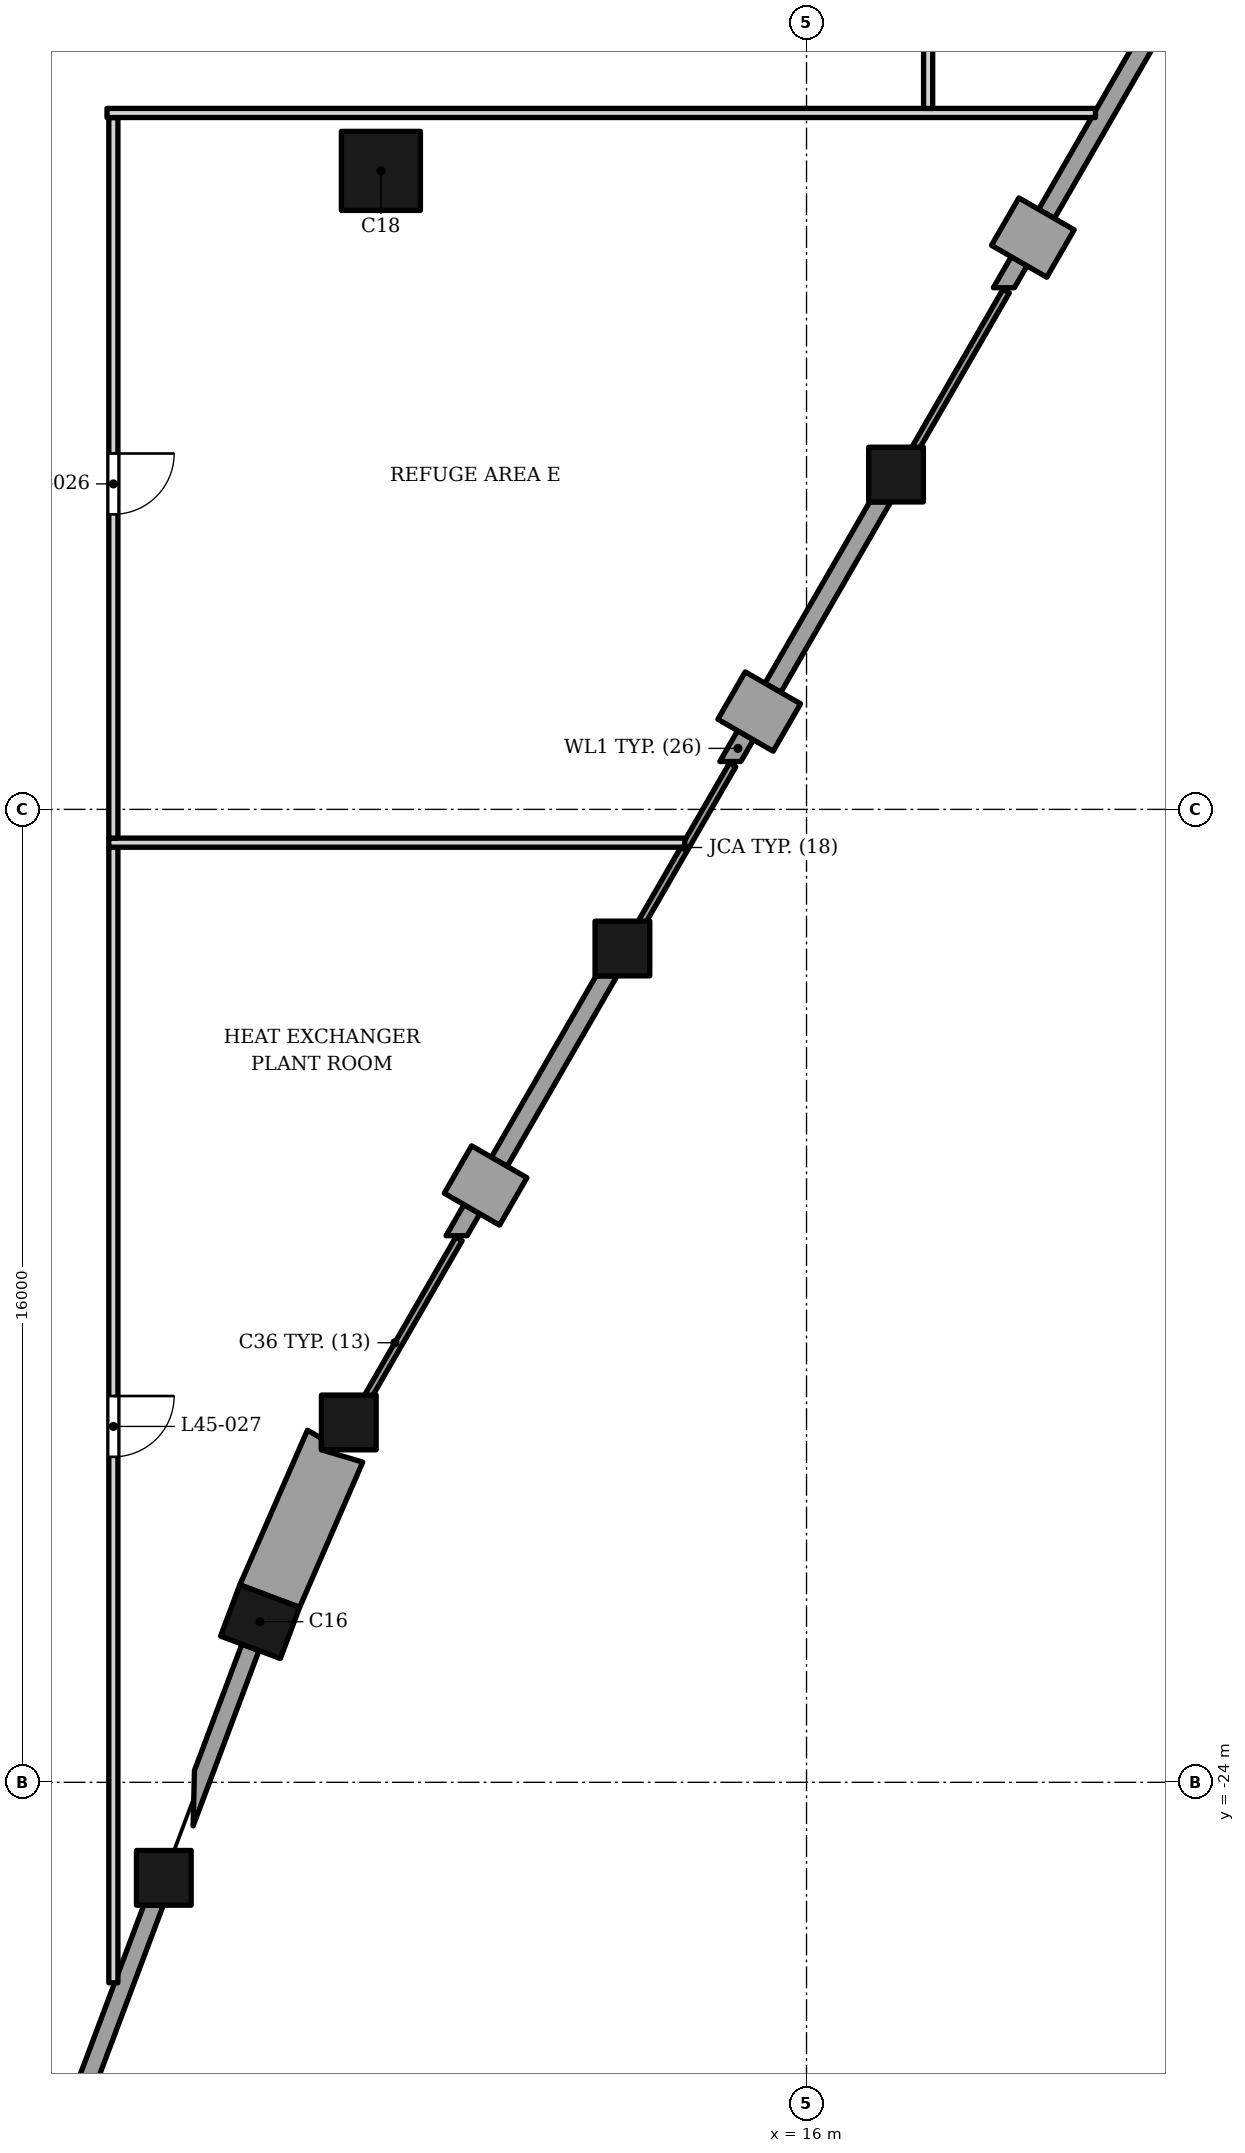
"""IFC4 building model, lengths in metres.
Left out: names, types, materials, properties, quantities, classifications, styles, units other than length and angle.
Written with IfcOpenShell. Run it as: python <this file> out.ifc"""

import sys

from ifc_helpers import new_model, si_unit, direction, frame, frame_2d, origin, origin_2d, place, context, subcontext, project, spatial, polyline, rectangle, outline, extrude, clip, halfspace, element, fill, save


model = new_model("IFC4")
c1 = context("Model", 3, precision=1e-05, world=origin(), true_north=direction((0.0, 1.0)))
c2 = subcontext(c1, "Body", "Model", "MODEL_VIEW")
j1 = project(units=[si_unit("LENGTHUNIT", "METRE"), si_unit("PLANEANGLEUNIT", "RADIAN")], contexts=[c1])
p1 = place(None, origin())
s1 = spatial("IfcSite", under=j1, at=p1, CompositionType="ELEMENT")
p2 = place(p1, origin())
s2 = spatial("IfcBuilding", under=s1, at=p2, CompositionType="ELEMENT")
p3 = place(p2, frame((0.0, 0.0, 191.4)))
s3 = spatial("IfcBuildingStorey", under=s2, at=p3, CompositionType="ELEMENT", Elevation=191.4)
p4 = place(p3, frame((7.013, -21.359, 0.0), z_axis=(0.0, 0.0, 1.0), x_axis=(0.351822451979, 0.936066750977, 0.0)))
e1 = element("IfcColumn", 1, at=p4, inside=s3, PredefinedType="COLUMN", context=c2, shape_type="SweptSolid", body=[
    extrude(rectangle(XDim=0.9, YDim=1.05, at=origin_2d()), origin(), (0.0, 0.0, 1.0), 5.0),
])
p5 = place(p3, frame((9.0, 2.5, 0.0), z_axis=(0.0, 0.0, 1.0), x_axis=(1.0, 0.0, 0.0)))
e2 = element("IfcColumn", 2, at=p5, inside=s3, PredefinedType="COLUMN", context=c2, shape_type="SweptSolid", body=[
    extrude(rectangle(XDim=1.3, YDim=1.3, at=origin_2d()), origin(), (0.0, 0.0, 1.0), 5.0),
])
p6 = place(p3, frame((5.43, -25.571, 0.0), z_axis=(0.010188943568, 0.420448971331, 0.90725897512), x_axis=(-0.999706498383, 0.024226371787, 0.0)))
e3 = element("IfcColumn", 3, at=p6, inside=s3, PredefinedType="COLUMN", context=c2, shape_type="Clipping", body=[
    clip(clip(extrude(rectangle(XDim=0.9, YDim=0.9, at=origin_2d()), origin(), (0.0, 0.0, 1.0), 5.511), halfspace(frame((0.0, 0.0, 0.213), z_axis=(0.0, 0.0, 1.0), x_axis=(1.0, 0.0, 0.0)), True)), halfspace(frame((0.0, 0.0, 5.298), z_axis=(0.0, 0.0, 1.0), x_axis=(1.0, 0.0, 0.0)), False)),
])
p7 = place(p3, frame((8.472, -18.082, 0.0), z_axis=(0.259037390288, 0.448574906754, 0.855383062413), x_axis=(-0.865981474287, 0.500076080403, 0.0)))
e4 = element("IfcColumn", 4, at=p7, inside=s3, PredefinedType="COLUMN", context=c2, shape_type="Clipping", body=[
    clip(clip(extrude(rectangle(XDim=0.9, YDim=0.9, at=origin_2d()), origin(), (0.0, 0.0, 1.0), 5.845), halfspace(frame((0.0, 0.0, 0.277), z_axis=(0.0, 0.0, 1.0), x_axis=(1.0, 0.0, 0.0)), True)), halfspace(frame((0.0, 0.0, 5.568), z_axis=(0.0, 0.0, 1.0), x_axis=(1.0, 0.0, 0.0)), False)),
])
p8 = place(p3, frame((12.972, -10.288, 0.0), z_axis=(0.258979139015, 0.448975121363, 0.855190707358), x_axis=(-0.866223138365, 0.499657357156, 0.0)))
e5 = element("IfcColumn", 5, at=p8, inside=s3, PredefinedType="COLUMN", context=c2, shape_type="Clipping", body=[
    clip(clip(extrude(rectangle(XDim=0.9, YDim=0.9, at=origin_2d()), origin(), (0.0, 0.0, 1.0), 5.847), halfspace(frame((0.0, 0.0, 0.277), z_axis=(0.0, 0.0, 1.0), x_axis=(1.0, 0.0, 0.0)), True)), halfspace(frame((0.0, 0.0, 5.57), z_axis=(0.0, 0.0, 1.0), x_axis=(1.0, 0.0, 0.0)), False)),
])
p9 = place(p3, frame((17.472, -2.494, 0.0), z_axis=(0.259022829884, 0.448674985721, 0.855334981622), x_axis=(-0.866041947256, 0.499971344772, 0.0)))
e6 = element("IfcColumn", 6, at=p9, inside=s3, PredefinedType="COLUMN", context=c2, shape_type="Clipping", body=[
    clip(clip(extrude(rectangle(XDim=0.9, YDim=0.9, at=origin_2d()), origin(), (0.0, 0.0, 1.0), 5.846), halfspace(frame((0.0, 0.0, 0.277), z_axis=(0.0, 0.0, 1.0), x_axis=(1.0, 0.0, 0.0)), True)), halfspace(frame((0.0, 0.0, 5.569), z_axis=(0.0, 0.0, 1.0), x_axis=(1.0, 0.0, 0.0)), False)),
])
p10 = place(p3, origin())
e7 = element("IfcWall", 7, at=p10, inside=s3, PredefinedType="ELEMENTEDWALL", context=c2, shape_type="SweptSolid", body=[
    extrude(outline(polyline([(5.412, -26.045), (5.347, -26.021), (5.101, -26.021), (3.865, -29.31), (4.146, -29.415), (5.412, -26.045)])), origin(), (0.0, 0.0, 1.0), 3.5),
])
p11 = place(p3, origin())
e8 = element("IfcWall", 8, at=p11, inside=s3, PredefinedType="ELEMENTEDWALL", context=c2, shape_type="SweptSolid", body=[
    extrude(outline(polyline([(5.912, -24.717), (6.995, -21.833), (6.715, -21.728), (5.934, -23.805), (5.912, -24.717)])), origin(), (0.0, 0.0, 1.0), 3.5),
])
for number, where, z_axis, x_axis in (
    (9, (11.176, -14.448, 0.0), (0.0, 0.0, 1.0), (-0.866, 0.5, 0.0)),
    (10, (15.676, -6.653, 0.0), (0.0, 0.0, 1.0), (-0.866, 0.5, 0.0)),
    (11, (19.267, 1.666, 0.0), (0.0, 0.0, 1.0), (0.866, -0.5, 0.0)),
):
    element("IfcWall", number, at=place(p3, frame(where, z_axis=z_axis, x_axis=x_axis)), inside=s3, PredefinedType="SOLIDWALL", context=c2, shape_type="SweptSolid", body=[
        extrude(rectangle(XDim=1.05, YDim=0.9, at=frame_2d((0.525, 0.0))), origin(), (0.0, 0.0, 1.0), 3.5),
    ])
p12 = place(p3, origin())
e12 = element("IfcWall", 12, at=p12, inside=s3, PredefinedType="ELEMENTEDWALL", context=c2, shape_type="SweptSolid", body=[
    extrude(outline(polyline([(10.367, -14.5), (10.072, -15.01), (10.419, -15.01), (10.627, -14.65), (10.367, -14.5)])), origin(), (0.0, 0.0, 1.0), 3.5),
])
p13 = place(p3, origin())
e13 = element("IfcWall", 13, at=p13, inside=s3, PredefinedType="ELEMENTEDWALL", context=c2, shape_type="SweptSolid", body=[
    extrude(outline(polyline([(12.877, -10.753), (12.851, -10.738), (12.539, -10.738), (10.817, -13.72), (11.077, -13.87), (12.877, -10.753)])), origin(), (0.0, 0.0, 1.0), 3.5),
])
p14 = place(p3, origin())
e14 = element("IfcWall", 14, at=p14, inside=s3, PredefinedType="ELEMENTEDWALL", context=c2, shape_type="SweptSolid", body=[
    extrude(outline(polyline([(14.867, -6.706), (14.574, -7.213), (14.92, -7.213), (15.127, -6.856), (14.867, -6.706)])), origin(), (0.0, 0.0, 1.0), 3.5),
])
p15 = place(p3, origin())
e15 = element("IfcWall", 15, at=p15, inside=s3, PredefinedType="ELEMENTEDWALL", context=c2, shape_type="SweptSolid", body=[
    extrude(outline(polyline([(17.377, -2.958), (17.352, -2.944), (17.039, -2.944), (15.317, -5.926), (15.577, -6.076), (17.377, -2.958)])), origin(), (0.0, 0.0, 1.0), 3.5),
])
p16 = place(p3, origin())
e16 = element("IfcWall", 16, at=p16, inside=s3, PredefinedType="ELEMENTEDWALL", context=c2, shape_type="SweptSolid", body=[
    extrude(outline(polyline([(19.367, 1.089), (19.073, 0.579), (19.419, 0.579), (19.627, 0.939), (19.367, 1.089)])), origin(), (0.0, 0.0, 1.0), 3.5),
])
p17 = place(p3, origin())
e17 = element("IfcWall", 17, at=p17, inside=s3, PredefinedType="ELEMENTEDWALL", context=c2, shape_type="SweptSolid", body=[
    extrude(outline(polyline([(21.877, 4.836), (21.852, 4.85), (21.538, 4.85), (19.817, 1.868), (20.077, 1.718), (21.877, 4.836)])), origin(), (0.0, 0.0, 1.0), 3.5),
])
p18 = place(p3, origin())
e18 = element("IfcWall", 18, at=p18, inside=s3, PredefinedType="SOLIDWALL", context=c2, shape_type="SweptSolid", body=[
    extrude(outline(polyline([(6.68, -20.753), (7.663, -21.123), (8.701, -18.734), (8.022, -18.532), (8.022, -18.342), (7.792, -18.209), (6.68, -20.753)])), origin(), (0.0, 0.0, 1.0), 3.5),
])
for number, where, z_axis, x_axis in (
    (19, (8.717, -17.778, 0.0), (0.0, 0.0, 1.0), (0.5, 0.866, 0.0)),
    (20, (13.216, -9.984, 0.0), (0.0, 0.0, 1.0), (0.5, 0.866, 0.0)),
    (21, (17.716, -2.19, 0.0), (0.0, 0.0, 1.0), (0.5, 0.866, 0.0)),
):
    element("IfcWall", number, at=place(p3, frame(where, z_axis=z_axis, x_axis=x_axis)), inside=s3, PredefinedType="SOLIDWALL", context=c2, shape_type="SweptSolid", body=[
        extrude(rectangle(XDim=3.135, YDim=0.12, at=frame_2d((1.567, 0.0))), origin(), (0.0, 0.0, 1.0), 3.5),
    ])
p19 = place(p3, frame((4.6, -27.297, 0.0), z_axis=(0.0, 0.0, 1.0), x_axis=(0.0, 1.0, 0.0)))
e22 = element("IfcWall", 22, at=p19, inside=s3, PredefinedType="PARTITIONING", context=c2, shape_type="SweptSolid", body=[
    extrude(rectangle(XDim=18.674, YDim=0.15, at=frame_2d((9.337, 0.0))), origin(), (0.0, 0.0, 1.0), 3.752),
])
p20 = place(p19, frame((8.649, 0.0, 0.0)))
e23 = element("IfcOpeningElement", 23, at=p20, cuts=e22, PredefinedType="OPENING", context=c2, shape_type="SweptSolid", body=[
    extrude(rectangle(XDim=1.0, YDim=2.1, at=frame_2d((0.5, 1.05))), frame((0.0, 0.085, 0.0), z_axis=(0.0, -1.0, 0.0), x_axis=(1.0, 0.0, 0.0)), (0.0, 0.0, 1.0), 0.17),
])
p21 = place(p3, frame((4.525, -8.547, 0.0), z_axis=(0.0, 0.0, 1.0), x_axis=(1.0, 0.0, 0.0)))
e24 = element("IfcWall", 24, at=p21, inside=s3, PredefinedType="PARTITIONING", context=c2, shape_type="SweptSolid", body=[
    extrude(rectangle(XDim=9.472, YDim=0.15, at=frame_2d((4.736, 0.0))), origin(), (0.0, 0.0, 1.0), 3.984),
])
p22 = place(p3, frame((4.6, -8.472, 0.0), z_axis=(0.0, 0.0, 1.0), x_axis=(0.0, 1.0, 0.0)))
e25 = element("IfcWall", 25, at=p22, inside=s3, PredefinedType="PARTITIONING", context=c2, shape_type="SweptSolid", body=[
    extrude(rectangle(XDim=11.85, YDim=0.15, at=frame_2d((5.925, 0.0))), origin(), (0.0, 0.0, 1.0), 3.984),
])
p23 = place(p22, frame((5.325, 0.0, 0.0)))
e26 = element("IfcOpeningElement", 26, at=p23, cuts=e25, PredefinedType="OPENING", context=c2, shape_type="SweptSolid", body=[
    extrude(rectangle(XDim=1.0, YDim=2.1, at=frame_2d((0.5, 1.05))), frame((0.0, 0.085, 0.0), z_axis=(0.0, -1.0, 0.0), x_axis=(1.0, 0.0, 0.0)), (0.0, 0.0, 1.0), 0.17),
])
p24 = place(p3, frame((4.495, 3.453, 0.0), z_axis=(0.0, 0.0, 1.0), x_axis=(1.0, 0.0, 0.0)))
e27 = element("IfcWall", 27, at=p24, inside=s3, PredefinedType="PARTITIONING", context=c2, shape_type="SweptSolid", body=[
    extrude(rectangle(XDim=16.257, YDim=0.15, at=frame_2d((8.128, 0.0))), origin(), (0.0, 0.0, 1.0), 3.984),
])
p25 = place(p3, frame((18.0, 3.528, 0.0), z_axis=(0.0, 0.0, 1.0), x_axis=(0.0, 1.0, 0.0)))
e28 = element("IfcWall", 28, at=p25, inside=s3, PredefinedType="PARTITIONING", context=c2, shape_type="SweptSolid", body=[
    extrude(rectangle(XDim=7.65, YDim=0.15, at=frame_2d((3.825, 0.0))), origin(), (0.0, 0.0, 1.0), 4.05),
])
p26 = place(p25, frame((3.375, 0.0, 0.0)))
e29 = element("IfcOpeningElement", 29, at=p26, cuts=e28, PredefinedType="OPENING", context=c2, shape_type="SweptSolid", body=[
    extrude(rectangle(XDim=1.0, YDim=2.1, at=frame_2d((0.5, 1.05))), frame((0.0, 0.085, 0.0), z_axis=(0.0, -1.0, 0.0), x_axis=(1.0, 0.0, 0.0)), (0.0, 0.0, 1.0), 0.17),
])
p27 = place(p23, origin())
e30 = element("IfcDoor", 30, at=p27, inside=s3, OperationType="SINGLE_SWING_RIGHT", PredefinedType="DOOR", context=c2, shape_type="SweptSolid", body=[
    extrude(rectangle(XDim=1.0, YDim=2.1, at=frame_2d((0.5, 1.05))), frame((0.0, 0.025, 0.0), z_axis=(0.0, -1.0, 0.0), x_axis=(1.0, 0.0, 0.0)), (0.0, 0.0, 1.0), 0.05),
])
fill(e26, e30)
p28 = place(p20, origin())
e31 = element("IfcDoor", 31, at=p28, inside=s3, OperationType="SINGLE_SWING_RIGHT", PredefinedType="DOOR", context=c2, shape_type="SweptSolid", body=[
    extrude(rectangle(XDim=1.0, YDim=2.1, at=frame_2d((0.5, 1.05))), frame((0.0, 0.025, 0.0), z_axis=(0.0, -1.0, 0.0), x_axis=(1.0, 0.0, 0.0)), (0.0, 0.0, 1.0), 0.05),
])
fill(e23, e31)
save(model, sys.argv[1])
